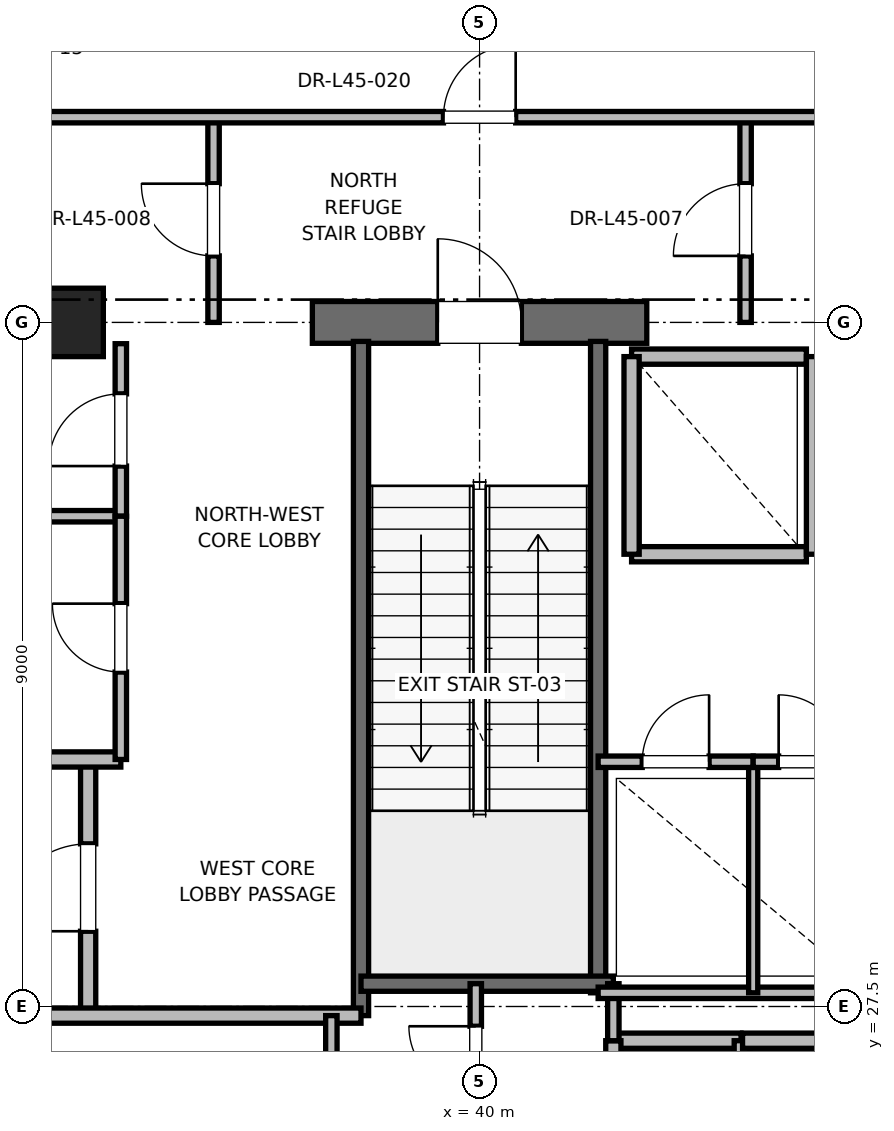
"""IFC4 building model, lengths in metres.
Left out: names, types, materials, properties, quantities, classifications, styles, units other than length and angle.
Written with IfcOpenShell. Run it as: python <this file> out.ifc"""

import sys

from ifc_helpers import new_model, si_unit, direction, frame, frame_2d, origin, origin_2d, place, context, subcontext, project, spatial, rectangle, extrude, element, fill, save


model = new_model("IFC4")
c1 = context("Model", 3, precision=1e-05, world=origin(), true_north=direction((0.0, 1.0)))
c2 = subcontext(c1, "Body", "Model", "MODEL_VIEW")
j1 = project(units=[si_unit("LENGTHUNIT", "METRE"), si_unit("PLANEANGLEUNIT", "RADIAN")], contexts=[c1])
p1 = place(None, origin())
s1 = spatial("IfcSite", under=j1, at=p1, CompositionType="ELEMENT")
p2 = place(p1, origin())
s2 = spatial("IfcBuilding", under=s1, at=p2, CompositionType="ELEMENT")
p3 = place(p2, frame((0.0, 0.0, 194.8)))
s3 = spatial("IfcBuildingStorey", under=s2, at=p3, CompositionType="ELEMENT", Elevation=194.8)
p4 = place(p3, frame((34.6, 36.5, 0.0), z_axis=(0.0, 0.0, 1.0), x_axis=(1.0, 0.0, 0.0)))
e1 = element("IfcColumn", 1, at=p4, inside=s3, PredefinedType="PILASTER", context=c2, shape_type="SweptSolid", body=[
    extrude(rectangle(XDim=0.9, YDim=0.9, at=origin_2d()), origin(), (0.0, 0.0, 1.0), 5.4),
])
p5 = place(p3, frame((29.0, 36.5, 0.0), z_axis=(0.0, 0.0, 1.0), x_axis=(1.0, 0.0, 0.0)))
e2 = element("IfcWall", 2, at=p5, inside=s3, PredefinedType="SHEAR", context=c2, shape_type="SweptSolid", body=[
    extrude(rectangle(XDim=5.8, YDim=0.55, at=frame_2d((2.9, 0.0))), origin(), (0.0, 0.0, 1.0), 5.1),
])
p6 = place(p3, frame((37.8, 36.5, 0.0), z_axis=(0.0, 0.0, 1.0), x_axis=(1.0, 0.0, 0.0)))
e3 = element("IfcWall", 3, at=p6, inside=s3, PredefinedType="SHEAR", context=c2, shape_type="SweptSolid", body=[
    extrude(rectangle(XDim=4.4, YDim=0.55, at=frame_2d((2.2, 0.0))), origin(), (0.0, 0.0, 1.0), 5.1),
])
p7 = place(p6, frame((1.65, 0.0, 0.0)))
e4 = element("IfcOpeningElement", 4, at=p7, cuts=e3, PredefinedType="OPENING", context=c2, shape_type="SweptSolid", body=[
    extrude(rectangle(XDim=1.1, YDim=2.15, at=frame_2d((0.55, 1.075))), frame((0.0, 0.275, 0.0), z_axis=(0.0, -1.0, 0.0), x_axis=(1.0, 0.0, 0.0)), (0.0, 0.0, 1.0), 0.55),
])
p8 = place(p3, frame((38.44, 27.38, 0.0), z_axis=(0.0, 0.0, 1.0), x_axis=(0.0, 1.0, 0.0)))
e5 = element("IfcWall", 5, at=p8, inside=s3, PredefinedType="SOLIDWALL", context=c2, shape_type="SweptSolid", body=[
    extrude(rectangle(XDim=8.87, YDim=0.2, at=frame_2d((4.435, 0.0))), origin(), (0.0, 0.0, 1.0), 5.1),
])
p9 = place(p3, frame((41.56, 27.68, 0.0), z_axis=(0.0, 0.0, 1.0), x_axis=(0.0, 1.0, 0.0)))
e6 = element("IfcWall", 6, at=p9, inside=s3, PredefinedType="SOLIDWALL", context=c2, shape_type="SweptSolid", body=[
    extrude(rectangle(XDim=8.57, YDim=0.2, at=frame_2d((4.285, 0.0))), origin(), (0.0, 0.0, 1.0), 5.1),
])
p10 = place(p3, frame((38.44, 27.8, 0.0), z_axis=(0.0, 0.0, 1.0), x_axis=(1.0, 0.0, 0.0)))
e7 = element("IfcWall", 7, at=p10, inside=s3, PredefinedType="SOLIDWALL", context=c2, shape_type="SweptSolid", body=[
    extrude(rectangle(XDim=3.32, YDim=0.2, at=frame_2d((1.66, 0.0))), origin(), (0.0, 0.0, 1.0), 5.1),
])
p11 = place(p3, frame((34.85, 27.38, 0.0), z_axis=(0.0, 0.0, 1.0), x_axis=(0.0, 1.0, 0.0)))
e8 = element("IfcWall", 8, at=p11, inside=s3, PredefinedType="PARTITIONING", context=c2, shape_type="SweptSolid", body=[
    extrude(rectangle(XDim=3.37, YDim=0.2, at=frame_2d((1.685, 0.0))), origin(), (0.0, 0.0, 1.0), 5.1),
])
p12 = place(p11, frame((1.11, 0.0, 0.0)))
e9 = element("IfcOpeningElement", 9, at=p12, cuts=e8, PredefinedType="OPENING", context=c2, shape_type="SweptSolid", body=[
    extrude(rectangle(XDim=1.15, YDim=2.2, at=frame_2d((0.575, 1.1))), frame((0.0, 0.1, 0.0), z_axis=(0.0, -1.0, 0.0), x_axis=(1.0, 0.0, 0.0)), (0.0, 0.0, 1.0), 0.2),
])
p13 = place(p3, frame((32.82, 27.38, 0.0), z_axis=(0.0, 0.0, 1.0), x_axis=(1.0, 0.0, 0.0)))
e10 = element("IfcWall", 10, at=p13, inside=s3, PredefinedType="PARTITIONING", context=c2, shape_type="SweptSolid", body=[
    extrude(rectangle(XDim=5.62, YDim=0.2, at=frame_2d((2.81, 0.0))), origin(), (0.0, 0.0, 1.0), 5.1),
])
p14 = place(p3, frame((32.15, 30.75, 0.0), z_axis=(0.0, 0.0, 1.0), x_axis=(1.0, 0.0, 0.0)))
e11 = element("IfcWall", 11, at=p14, inside=s3, PredefinedType="PARTITIONING", context=c2, shape_type="SweptSolid", body=[
    extrude(rectangle(XDim=3.13, YDim=0.2, at=frame_2d((1.565, 0.0))), origin(), (0.0, 0.0, 1.0), 5.1),
])
p15 = place(p3, frame((43.44, 27.05, 0.0), z_axis=(0.0, 0.0, 1.0), x_axis=(-1.0, 0.0, 0.0)))
e12 = element("IfcWall", 12, at=p15, inside=s3, PredefinedType="SOLIDWALL", context=c2, shape_type="SweptSolid", body=[
    extrude(rectangle(XDim=1.68, YDim=0.2, at=frame_2d((0.84, 0.0))), origin(), (0.0, 0.0, 1.0), 5.1),
])
for number, where, z_axis, x_axis in (
    (13, (41.76, 27.05, 0.0), (0.0, 0.0, 1.0), (0.0, -1.0, 0.0)),
    (14, (43.45, 24.45, 0.0), (0.0, 0.0, 1.0), (0.0, 1.0, 0.0)),
):
    element("IfcWall", number, at=place(p3, frame(where, z_axis=z_axis, x_axis=x_axis)), inside=s3, PredefinedType="SOLIDWALL", context=c2, shape_type="SweptSolid", body=[
        extrude(rectangle(XDim=2.6, YDim=0.2, at=frame_2d((1.3, 0.0))), origin(), (0.0, 0.0, 1.0), 5.1),
    ])
p16 = place(p3, frame((45.12, 27.05, 0.0), z_axis=(0.0, 0.0, 1.0), x_axis=(-1.0, 0.0, 0.0)))
e15 = element("IfcWall", 15, at=p16, inside=s3, PredefinedType="SOLIDWALL", context=c2, shape_type="SweptSolid", body=[
    extrude(rectangle(XDim=1.66, YDim=0.2, at=frame_2d((0.83, 0.0))), origin(), (0.0, 0.0, 1.0), 5.1),
])
p17 = place(p3, frame((42.0, 33.45, 0.0), z_axis=(0.0, 0.0, 1.0), x_axis=(1.0, 0.0, 0.0)))
e16 = element("IfcWall", 16, at=p17, inside=s3, PredefinedType="SOLIDWALL", context=c2, shape_type="SweptSolid", body=[
    extrude(rectangle(XDim=2.3, YDim=0.2, at=frame_2d((1.15, 0.0))), origin(), (0.0, 0.0, 1.0), 5.1),
])
p18 = place(p3, frame((44.3, 36.05, 0.0), z_axis=(0.0, 0.0, 1.0), x_axis=(-1.0, 0.0, 0.0)))
e17 = element("IfcWall", 17, at=p18, inside=s3, PredefinedType="SOLIDWALL", context=c2, shape_type="SweptSolid", body=[
    extrude(rectangle(XDim=2.3, YDim=0.2, at=frame_2d((1.15, 0.0))), origin(), (0.0, 0.0, 1.0), 4.08),
])
for number, where, z_axis, x_axis in (
    (18, (42.0, 36.05, 0.0), (0.0, 0.0, 1.0), (0.0, -1.0, 0.0)),
    (19, (44.4, 33.45, 0.0), (0.0, 0.0, 1.0), (0.0, 1.0, 0.0)),
):
    element("IfcWall", number, at=place(p3, frame(where, z_axis=z_axis, x_axis=x_axis)), inside=s3, PredefinedType="SOLIDWALL", context=c2, shape_type="SweptSolid", body=[
        extrude(rectangle(XDim=2.6, YDim=0.2, at=frame_2d((1.3, 0.0))), origin(), (0.0, 0.0, 1.0), 4.08),
    ])
p19 = place(p3, frame((41.76, 27.05, 0.0), z_axis=(0.0, 0.0, 1.0), x_axis=(0.0, 1.0, 0.0)))
e20 = element("IfcWall", 20, at=p19, inside=s3, PredefinedType="PARTITIONING", context=c2, shape_type="SweptSolid", body=[
    extrude(rectangle(XDim=0.75, YDim=0.15, at=frame_2d((0.375, 0.0))), origin(), (0.0, 0.0, 1.0), 2.85),
])
p20 = place(p3, frame((39.95, 25.8, 0.0), z_axis=(0.0, 0.0, 1.0), x_axis=(0.0, 1.0, 0.0)))
e21 = element("IfcWall", 21, at=p20, inside=s3, PredefinedType="PARTITIONING", context=c2, shape_type="SweptSolid", body=[
    extrude(rectangle(XDim=2.0, YDim=0.15, at=frame_2d((1.0, 0.0))), origin(), (0.0, 0.0, 1.0), 2.85),
])
p21 = place(p20, frame((0.56, 0.0, 0.0)))
e22 = element("IfcOpeningElement", 22, at=p21, cuts=e21, PredefinedType="OPENING", context=c2, shape_type="SweptSolid", body=[
    extrude(rectangle(XDim=0.88, YDim=2.1, at=frame_2d((0.44, 1.05))), frame((0.0, 0.075, 0.0), z_axis=(0.0, -1.0, 0.0), x_axis=(1.0, 0.0, 0.0)), (0.0, 0.0, 1.0), 0.15),
])
p22 = place(p3, frame((32.15, 33.95, 0.0), z_axis=(0.0, 0.0, 1.0), x_axis=(1.0, 0.0, 0.0)))
e23 = element("IfcWall", 23, at=p22, inside=s3, PredefinedType="PARTITIONING", context=c2, shape_type="SweptSolid", body=[
    extrude(rectangle(XDim=3.13, YDim=0.15, at=frame_2d((1.565, 0.0))), origin(), (0.0, 0.0, 1.0), 2.85),
])
p23 = place(p3, frame((35.28, 33.95, 0.0), z_axis=(0.0, 0.0, 1.0), x_axis=(0.0, 1.0, 0.0)))
e24 = element("IfcWall", 24, at=p23, inside=s3, PredefinedType="PARTITIONING", context=c2, shape_type="SweptSolid", body=[
    extrude(rectangle(XDim=2.27, YDim=0.15, at=frame_2d((1.135, 0.0))), origin(), (0.0, 0.0, 1.0), 2.85),
])
p24 = place(p23, frame((0.66, 0.0, 0.0)))
e25 = element("IfcOpeningElement", 25, at=p24, cuts=e24, PredefinedType="OPENING", context=c2, shape_type="SweptSolid", body=[
    extrude(rectangle(XDim=0.95, YDim=2.15, at=frame_2d((0.475, 1.075))), frame((0.0, 0.075, 0.0), z_axis=(0.0, -1.0, 0.0), x_axis=(1.0, 0.0, 0.0)), (0.0, 0.0, 1.0), 0.15),
])
p25 = place(p3, frame((35.28, 30.75, 0.0), z_axis=(0.0, 0.0, 1.0), x_axis=(0.0, 1.0, 0.0)))
e26 = element("IfcWall", 26, at=p25, inside=s3, PredefinedType="PARTITIONING", context=c2, shape_type="SweptSolid", body=[
    extrude(rectangle(XDim=3.2, YDim=0.15, at=frame_2d((1.6, 0.0))), origin(), (0.0, 0.0, 1.0), 2.85),
])
p26 = place(p25, frame((1.15, 0.0, 0.0)))
e27 = element("IfcOpeningElement", 27, at=p26, cuts=e26, PredefinedType="OPENING", context=c2, shape_type="SweptSolid", body=[
    extrude(rectangle(XDim=0.9, YDim=2.1, at=frame_2d((0.45, 1.05))), frame((0.0, 0.075, 0.0), z_axis=(0.0, -1.0, 0.0), x_axis=(1.0, 0.0, 0.0)), (0.0, 0.0, 1.0), 0.15),
])
p27 = place(p3, frame((38.05, 24.5, 0.0), z_axis=(0.0, 0.0, 1.0), x_axis=(0.0, 1.0, 0.0)))
e28 = element("IfcWall", 28, at=p27, inside=s3, PredefinedType="PARTITIONING", context=c2, shape_type="SweptSolid", body=[
    extrude(rectangle(XDim=2.88, YDim=0.15, at=frame_2d((1.44, 0.0))), origin(), (0.0, 0.0, 1.0), 2.85),
])
p28 = place(p27, frame((1.0, 0.0, 0.0)))
e29 = element("IfcOpeningElement", 29, at=p28, cuts=e28, PredefinedType="OPENING", context=c2, shape_type="SweptSolid", body=[
    extrude(rectangle(XDim=0.88, YDim=2.1, at=frame_2d((0.44, 1.05))), frame((0.0, 0.075, 0.0), z_axis=(0.0, -1.0, 0.0), x_axis=(1.0, 0.0, 0.0)), (0.0, 0.0, 1.0), 0.15),
])
p29 = place(p3, frame((41.56, 27.68, 0.0), z_axis=(0.0, 0.0, 1.0), x_axis=(1.0, 0.0, 0.0)))
e30 = element("IfcWall", 30, at=p29, inside=s3, PredefinedType="PARTITIONING", context=c2, shape_type="SweptSolid", body=[
    extrude(rectangle(XDim=3.59, YDim=0.15, at=frame_2d((1.795, 0.0))), origin(), (0.0, 0.0, 1.0), 2.85),
])
p30 = place(p3, frame((43.6, 27.68, 0.0), z_axis=(0.0, 0.0, 1.0), x_axis=(0.0, 1.0, 0.0)))
e31 = element("IfcWall", 31, at=p30, inside=s3, PredefinedType="PARTITIONING", context=c2, shape_type="SweptSolid", body=[
    extrude(rectangle(XDim=3.04, YDim=0.12, at=frame_2d((1.52, 0.0))), origin(), (0.0, 0.0, 1.0), 2.85),
])
p31 = place(p3, frame((41.56, 30.72, 0.0), z_axis=(0.0, 0.0, 1.0), x_axis=(1.0, 0.0, 0.0)))
e32 = element("IfcWall", 32, at=p31, inside=s3, PredefinedType="PARTITIONING", context=c2, shape_type="SweptSolid", body=[
    extrude(rectangle(XDim=2.04, YDim=0.15, at=frame_2d((1.02, 0.0))), origin(), (0.0, 0.0, 1.0), 2.85),
])
p32 = place(p31, frame((0.58, 0.0, 0.0)))
e33 = element("IfcOpeningElement", 33, at=p32, cuts=e32, PredefinedType="OPENING", context=c2, shape_type="SweptSolid", body=[
    extrude(rectangle(XDim=0.88, YDim=2.1, at=frame_2d((0.44, 1.05))), frame((0.0, 0.075, 0.0), z_axis=(0.0, -1.0, 0.0), x_axis=(1.0, 0.0, 0.0)), (0.0, 0.0, 1.0), 0.15),
])
p33 = place(p3, frame((43.6, 30.72, 0.0), z_axis=(0.0, 0.0, 1.0), x_axis=(1.0, 0.0, 0.0)))
e34 = element("IfcWall", 34, at=p33, inside=s3, PredefinedType="PARTITIONING", context=c2, shape_type="SweptSolid", body=[
    extrude(rectangle(XDim=1.55, YDim=0.15, at=frame_2d((0.775, 0.0))), origin(), (0.0, 0.0, 1.0), 2.85),
])
p34 = place(p33, frame((0.335, 0.0, 0.0)))
e35 = element("IfcOpeningElement", 35, at=p34, cuts=e34, PredefinedType="OPENING", context=c2, shape_type="SweptSolid", body=[
    extrude(rectangle(XDim=0.88, YDim=2.1, at=frame_2d((0.44, 1.05))), frame((0.0, 0.075, 0.0), z_axis=(0.0, -1.0, 0.0), x_axis=(1.0, 0.0, 0.0)), (0.0, 0.0, 1.0), 0.15),
])
p35 = place(p3, frame((36.5, 36.5, 0.0), z_axis=(0.0, 0.0, 1.0), x_axis=(0.0, 1.0, 0.0)))
e36 = element("IfcWall", 36, at=p35, inside=s3, PredefinedType="PARTITIONING", context=c2, shape_type="SweptSolid", body=[
    extrude(rectangle(XDim=2.7, YDim=0.15, at=frame_2d((1.35, 0.0))), origin(), (0.0, 0.0, 1.0), 2.85),
])
p36 = place(p35, frame((0.875, 0.0, 0.0)))
e37 = element("IfcOpeningElement", 37, at=p36, cuts=e36, PredefinedType="OPENING", context=c2, shape_type="SweptSolid", body=[
    extrude(rectangle(XDim=0.95, YDim=2.15, at=frame_2d((0.475, 1.075))), frame((0.0, 0.075, 0.0), z_axis=(0.0, -1.0, 0.0), x_axis=(1.0, 0.0, 0.0)), (0.0, 0.0, 1.0), 0.15),
])
p37 = place(p3, frame((43.5, 36.5, 0.0), z_axis=(0.0, 0.0, 1.0), x_axis=(0.0, 1.0, 0.0)))
e38 = element("IfcWall", 38, at=p37, inside=s3, PredefinedType="PARTITIONING", context=c2, shape_type="SweptSolid", body=[
    extrude(rectangle(XDim=2.7, YDim=0.15, at=frame_2d((1.35, 0.0))), origin(), (0.0, 0.0, 1.0), 2.85),
])
p38 = place(p37, frame((0.875, 0.0, 0.0)))
e39 = element("IfcOpeningElement", 39, at=p38, cuts=e38, PredefinedType="OPENING", context=c2, shape_type="SweptSolid", body=[
    extrude(rectangle(XDim=0.95, YDim=2.15, at=frame_2d((0.475, 1.075))), frame((0.0, 0.075, 0.0), z_axis=(0.0, -1.0, 0.0), x_axis=(1.0, 0.0, 0.0)), (0.0, 0.0, 1.0), 0.15),
])
p39 = place(p3, frame((29.25, 39.2, 0.0), z_axis=(0.0, 0.0, 1.0), x_axis=(1.0, 0.0, 0.0)))
e40 = element("IfcWall", 40, at=p39, inside=s3, PredefinedType="PARTITIONING", context=c2, shape_type="SweptSolid", body=[
    extrude(rectangle(XDim=21.5, YDim=0.15, at=frame_2d((10.75, 0.0))), origin(), (0.0, 0.0, 1.0), 2.85),
])
p40 = place(p39, frame((10.275, 0.0, 0.0)))
e41 = element("IfcOpeningElement", 41, at=p40, cuts=e40, PredefinedType="OPENING", context=c2, shape_type="SweptSolid", body=[
    extrude(rectangle(XDim=0.95, YDim=2.15, at=frame_2d((0.475, 1.075))), frame((0.0, 0.075, 0.0), z_axis=(0.0, -1.0, 0.0), x_axis=(1.0, 0.0, 0.0)), (0.0, 0.0, 1.0), 0.15),
])
p41 = place(p7, origin())
e42 = element("IfcDoor", 42, at=p41, inside=s3, OperationType="SINGLE_SWING_LEFT", PredefinedType="DOOR", context=c2, shape_type="SweptSolid", body=[
    extrude(rectangle(XDim=1.1, YDim=2.15, at=frame_2d((0.55, 1.075))), frame((0.0, 0.025, 0.0), z_axis=(0.0, -1.0, 0.0), x_axis=(1.0, 0.0, 0.0)), (0.0, 0.0, 1.0), 0.05),
])
fill(e4, e42)
p42 = place(p12, origin())
e43 = element("IfcDoor", 43, at=p42, inside=s3, OperationType="SINGLE_SWING_LEFT", PredefinedType="DOOR", context=c2, shape_type="SweptSolid", body=[
    extrude(rectangle(XDim=1.15, YDim=2.2, at=frame_2d((0.575, 1.1))), frame((0.0, 0.025, 0.0), z_axis=(0.0, -1.0, 0.0), x_axis=(1.0, 0.0, 0.0)), (0.0, 0.0, 1.0), 0.05),
])
fill(e9, e43)
p43 = place(p21, origin())
e44 = element("IfcDoor", 44, at=p43, inside=s3, OperationType="SINGLE_SWING_RIGHT", PredefinedType="DOOR", context=c2, shape_type="SweptSolid", body=[
    extrude(rectangle(XDim=0.88, YDim=2.1, at=frame_2d((0.44, 1.05))), frame((0.0, 0.025, 0.0), z_axis=(0.0, -1.0, 0.0), x_axis=(1.0, 0.0, 0.0)), (0.0, 0.0, 1.0), 0.05),
])
fill(e22, e44)
p44 = place(p24, origin())
e45 = element("IfcDoor", 45, at=p44, inside=s3, OperationType="SINGLE_SWING_LEFT", PredefinedType="DOOR", context=c2, shape_type="SweptSolid", body=[
    extrude(rectangle(XDim=0.95, YDim=2.15, at=frame_2d((0.475, 1.075))), frame((0.0, 0.025, 0.0), z_axis=(0.0, -1.0, 0.0), x_axis=(1.0, 0.0, 0.0)), (0.0, 0.0, 1.0), 0.05),
])
fill(e25, e45)
p45 = place(p26, origin())
e46 = element("IfcDoor", 46, at=p45, inside=s3, OperationType="SINGLE_SWING_RIGHT", PredefinedType="DOOR", context=c2, shape_type="SweptSolid", body=[
    extrude(rectangle(XDim=0.9, YDim=2.1, at=frame_2d((0.45, 1.05))), frame((0.0, 0.025, 0.0), z_axis=(0.0, -1.0, 0.0), x_axis=(1.0, 0.0, 0.0)), (0.0, 0.0, 1.0), 0.05),
])
fill(e27, e46)
p46 = place(p32, origin())
e47 = element("IfcDoor", 47, at=p46, inside=s3, OperationType="SINGLE_SWING_RIGHT", PredefinedType="DOOR", context=c2, shape_type="SweptSolid", body=[
    extrude(rectangle(XDim=0.88, YDim=2.1, at=frame_2d((0.44, 1.05))), frame((0.0, 0.025, 0.0), z_axis=(0.0, -1.0, 0.0), x_axis=(1.0, 0.0, 0.0)), (0.0, 0.0, 1.0), 0.05),
])
fill(e33, e47)
p47 = place(p34, origin())
e48 = element("IfcDoor", 48, at=p47, inside=s3, OperationType="SINGLE_SWING_LEFT", PredefinedType="DOOR", context=c2, shape_type="SweptSolid", body=[
    extrude(rectangle(XDim=0.88, YDim=2.1, at=frame_2d((0.44, 1.05))), frame((0.0, 0.025, 0.0), z_axis=(0.0, -1.0, 0.0), x_axis=(1.0, 0.0, 0.0)), (0.0, 0.0, 1.0), 0.05),
])
fill(e35, e48)
p48 = place(p36, origin())
e49 = element("IfcDoor", 49, at=p48, inside=s3, OperationType="SINGLE_SWING_RIGHT", PredefinedType="DOOR", context=c2, shape_type="SweptSolid", body=[
    extrude(rectangle(XDim=0.95, YDim=2.15, at=frame_2d((0.475, 1.075))), frame((0.0, 0.025, 0.0), z_axis=(0.0, -1.0, 0.0), x_axis=(1.0, 0.0, 0.0)), (0.0, 0.0, 1.0), 0.05),
])
fill(e37, e49)
p49 = place(p38, origin())
e50 = element("IfcDoor", 50, at=p49, inside=s3, OperationType="SINGLE_SWING_LEFT", PredefinedType="DOOR", context=c2, shape_type="SweptSolid", body=[
    extrude(rectangle(XDim=0.95, YDim=2.15, at=frame_2d((0.475, 1.075))), frame((0.0, 0.025, 0.0), z_axis=(0.0, -1.0, 0.0), x_axis=(1.0, 0.0, 0.0)), (0.0, 0.0, 1.0), 0.05),
])
fill(e39, e50)
p50 = place(p40, origin())
e51 = element("IfcDoor", 51, at=p50, inside=s3, OperationType="SINGLE_SWING_RIGHT", PredefinedType="DOOR", context=c2, shape_type="SweptSolid", body=[
    extrude(rectangle(XDim=0.95, YDim=2.15, at=frame_2d((0.475, 1.075))), frame((0.0, 0.025, 0.0), z_axis=(0.0, -1.0, 0.0), x_axis=(1.0, 0.0, 0.0)), (0.0, 0.0, 1.0), 0.05),
])
fill(e41, e51)
save(model, sys.argv[1])
